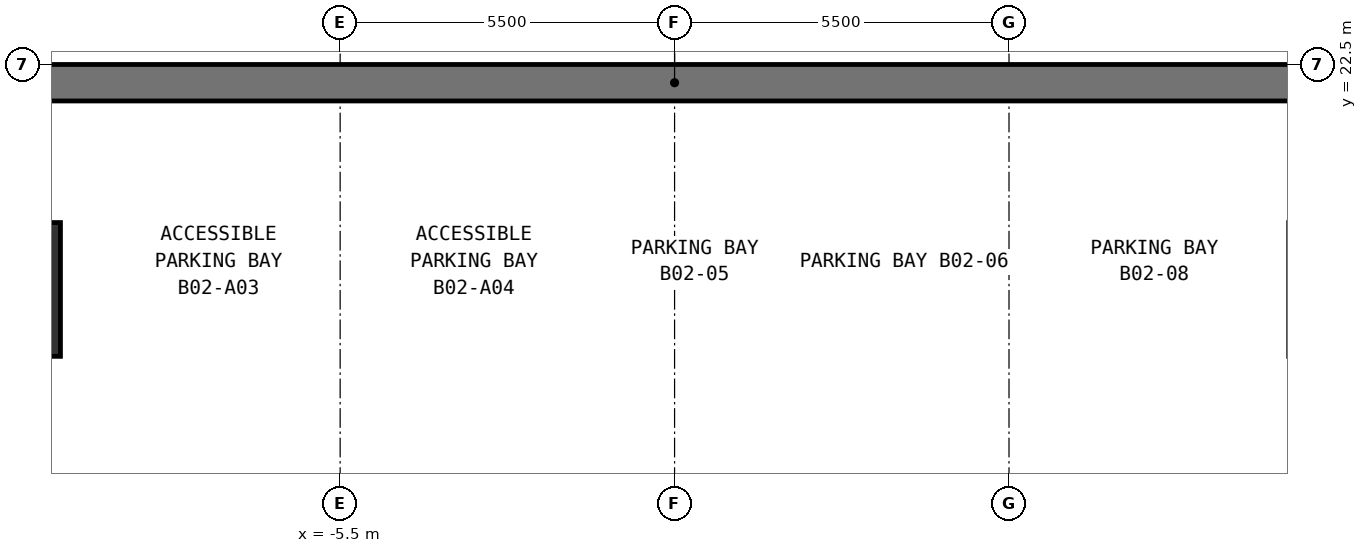
"""IFC4 building model, lengths in metres.
Left out: names, types, materials, properties, quantities, classifications, styles, units other than length and angle.
Written with IfcOpenShell. Run it as: python <this file> out.ifc"""

import sys

from ifc_helpers import new_model, si_unit, direction, frame, frame_2d, origin, origin_2d, place, context, subcontext, project, spatial, rectangle, extrude, element, save


model = new_model("IFC4")
c1 = context("Model", 3, precision=1e-05, world=origin(), true_north=direction((0.0, 1.0)))
c2 = subcontext(c1, "Body", "Model", "MODEL_VIEW")
j1 = project(units=[si_unit("LENGTHUNIT", "METRE"), si_unit("PLANEANGLEUNIT", "RADIAN")], contexts=[c1])
p1 = place(None, origin())
s1 = spatial("IfcSite", under=j1, at=p1, CompositionType="ELEMENT")
p2 = place(p1, origin())
s2 = spatial("IfcBuilding", under=s1, at=p2, CompositionType="ELEMENT")
p3 = place(p2, frame((0.0, 0.0, -9.0)))
s3 = spatial("IfcBuildingStorey", under=s2, at=p3, CompositionType="ELEMENT", Elevation=-9.0)
p4 = place(p3, frame((40.3, 22.2, 0.0), z_axis=(0.0, 0.0, 1.0), x_axis=(-1.0, 0.0, 0.0)))
e1 = element("IfcWall", 1, at=p4, inside=s3, PredefinedType="SOLIDWALL", context=c2, shape_type="SweptSolid", body=[
    extrude(rectangle(XDim=80.6, YDim=0.6, at=frame_2d((40.3, 0.0))), origin(), (0.0, 0.0, 1.0), 4.2),
])
p5 = place(p3, frame((-11.0, 18.8, 0.0), z_axis=(0.0, 0.0, 1.0), x_axis=(1.0, 0.0, 0.0)))
e2 = element("IfcColumn", 2, at=p5, inside=s3, PredefinedType="COLUMN", context=c2, shape_type="SweptSolid", body=[
    extrude(rectangle(XDim=1.8, YDim=2.2, at=origin_2d()), origin(), (0.0, 0.0, 1.0), 4.5),
])
save(model, sys.argv[1])
